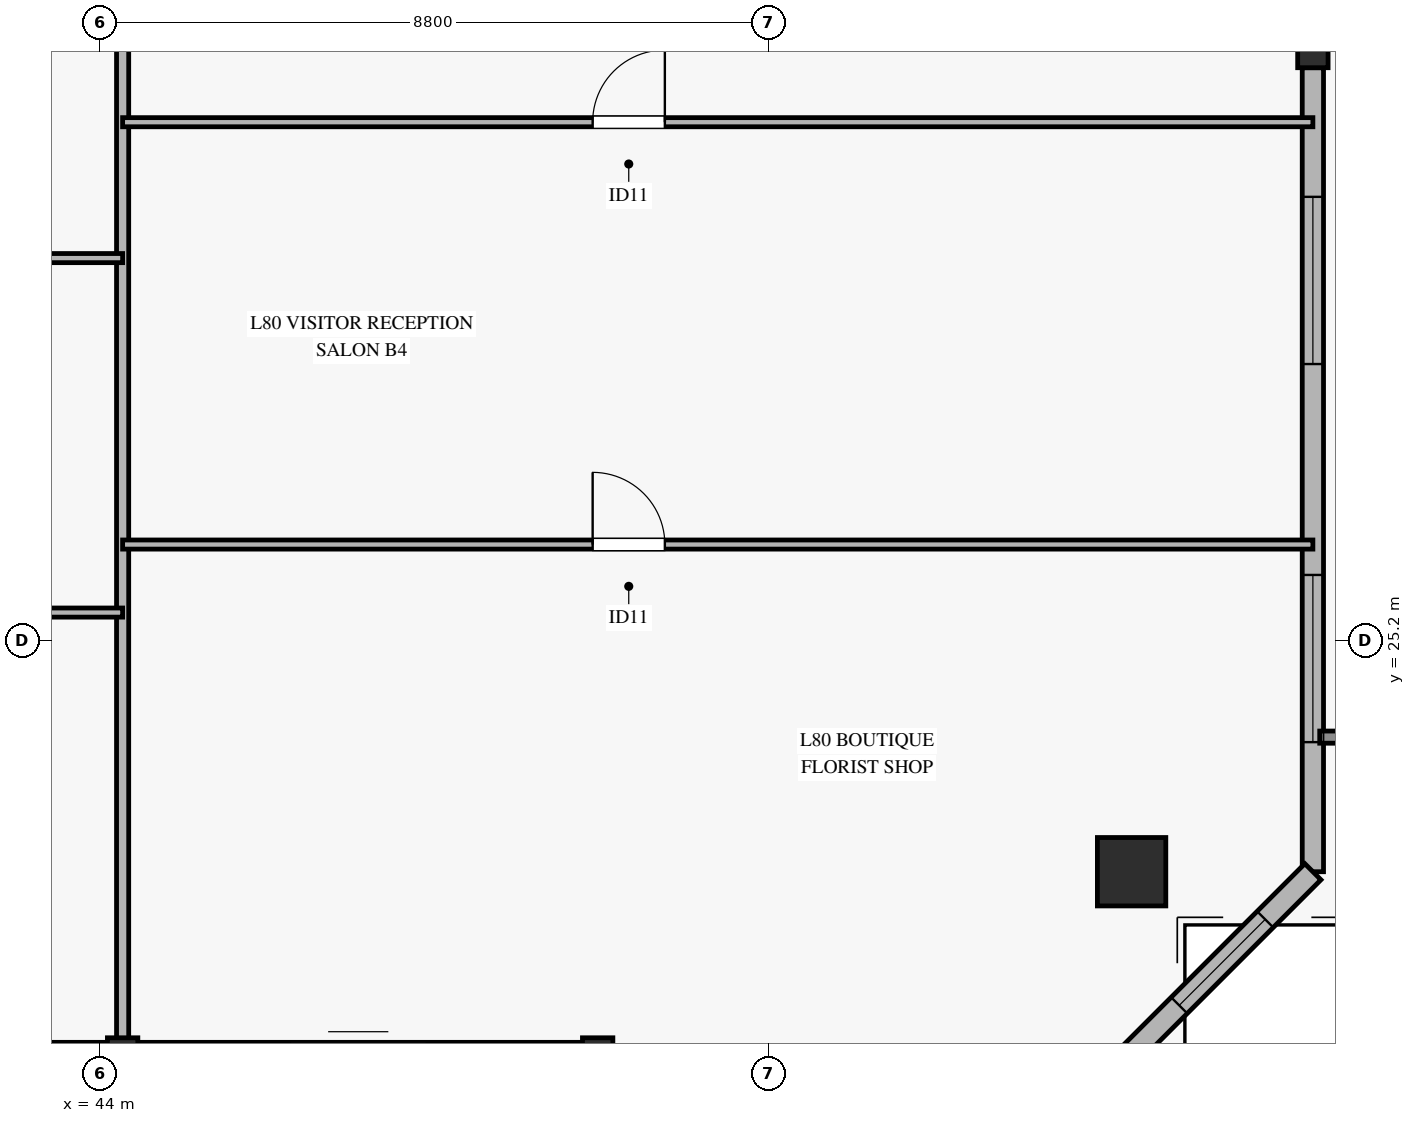
"""IFC4 building model, lengths in metres.
Left out: names, types, materials, properties, quantities, classifications, styles, units other than length and angle.
Written with IfcOpenShell. Run it as: python <this file> out.ifc"""

import sys

from ifc_helpers import new_model, si_unit, direction, frame, frame_2d, origin, origin_2d, place, context, subcontext, project, spatial, rectangle, hollow_rectangle, extrude, source, transform, mapped, element, fill, save


model = new_model("IFC4")
c1 = context("Model", 3, precision=1e-05, world=origin(), true_north=direction((0.0, 1.0)))
c2 = subcontext(c1, "Body", "Model", "MODEL_VIEW")
j1 = project(units=[si_unit("LENGTHUNIT", "METRE"), si_unit("PLANEANGLEUNIT", "RADIAN")], contexts=[c1])
p1 = place(None, origin())
s1 = spatial("IfcSite", under=j1, at=p1, CompositionType="ELEMENT")
p2 = place(p1, origin())
s2 = spatial("IfcBuilding", under=s1, at=p2, CompositionType="ELEMENT")
p3 = place(p2, frame((0.0, 0.0, 310.8)))
s3 = spatial("IfcBuildingStorey", under=s2, at=p3, CompositionType="ELEMENT", Elevation=310.8)
m1 = source(origin(), c2, "Body", "SweptSolid", [
    extrude(hollow_rectangle(XDim=0.9, YDim=0.9, WallThickness=0.04, at=origin_2d()), origin(), (0.0, 0.0, 1.0), 3.326),
])
p4 = place(p3, frame((57.575, 22.157, 0.0), z_axis=(-0.110324667468, 0.266085774831, 0.957615177501), x_axis=(-0.923746511534, -0.383004415679, 0.0)))
e1 = element("IfcColumn", 1, at=p4, inside=s3, PredefinedType="COLUMN", context=c2, shape_type="MappedRepresentation", body=[
    mapped(m1, transform((0.0, 0.0, 0.0), x_axis=(1.0, 0.0, 0.0), y_axis=(0.0, 1.0, 0.0), z_axis=(0.0, 0.0, 1.0), scale=1.0)),
])
m2 = source(origin(), c2, "Body", "SweptSolid", [
    extrude(hollow_rectangle(XDim=0.4, YDim=0.4, WallThickness=0.02, at=origin_2d()), origin(), (0.0, 0.0, 1.0), 3.319),
])
for number, where, z_axis, x_axis in (
    (2, (44.3, 19.772, 0.0), (0.0, 0.281, 0.96), (-1.0, 0.0, 0.0)),
    (3, (50.55, 19.772, 0.0), (0.0, 0.281, 0.96), (-1.0, 0.0, 0.0)),
):
    element("IfcColumn", number, at=place(p3, frame(where, z_axis=z_axis, x_axis=x_axis)), inside=s3, PredefinedType="COLUMN", context=c2, shape_type="MappedRepresentation", body=[
        mapped(m2, transform((0.0, 0.0, 0.0), x_axis=(1.0, 0.0, 0.0), y_axis=(0.0, 1.0, 0.0), z_axis=(0.0, 0.0, 1.0), scale=1.0)),
    ])
m3 = source(origin(), c2, "Body", "SweptSolid", [
    extrude(hollow_rectangle(XDim=0.4, YDim=0.4, WallThickness=0.02, at=origin_2d()), origin(), (0.0, 0.0, 1.0), 3.246),
])
p5 = place(p3, frame((59.96, 32.936, 0.0), z_axis=(-0.127580545586, 0.143603338163, 0.981377239219), x_axis=(-0.747582141628, -0.664169362075, 0.0)))
e4 = element("IfcColumn", 4, at=p5, inside=s3, PredefinedType="COLUMN", context=c2, shape_type="MappedRepresentation", body=[
    mapped(m3, transform((0.0, 0.0, 0.0), x_axis=(1.0, 0.0, 0.0), y_axis=(0.0, 1.0, 0.0), z_axis=(0.0, 0.0, 1.0), scale=1.0)),
])
p6 = place(p3, frame((37.75, 19.772, 0.0), z_axis=(0.0, 0.0, 1.0), x_axis=(1.0, 0.0, 0.0)))
e5 = element("IfcWall", 5, at=p6, inside=s3, PredefinedType="SOLIDWALL", context=c2, shape_type="SweptSolid", body=[
    extrude(rectangle(XDim=6.35, YDim=0.28, at=frame_2d((3.175, 0.0))), origin(), (0.0, 0.0, 1.0), 2.815),
])
p7 = place(p3, frame((44.5, 19.772, 0.0), z_axis=(0.0, 0.0, 1.0), x_axis=(1.0, 0.0, 0.0)))
e6 = element("IfcWall", 6, at=p7, inside=s3, PredefinedType="SOLIDWALL", context=c2, shape_type="SweptSolid", body=[
    extrude(rectangle(XDim=5.85, YDim=0.28, at=frame_2d((2.925, 0.0))), origin(), (0.0, 0.0, 1.0), 2.815),
])
p8 = place(p7, frame((2.0, 0.0, 0.0)))
e7 = element("IfcOpeningElement", 7, at=p8, cuts=e6, PredefinedType="OPENING", context=c2, shape_type="SweptSolid", body=[
    extrude(rectangle(XDim=1.8, YDim=2.25, at=frame_2d((0.9, 1.125))), frame((0.0, 0.15, 0.0), z_axis=(0.0, -1.0, 0.0), x_axis=(1.0, 0.0, 0.0)), (0.0, 0.0, 1.0), 0.3),
])
p9 = place(p3, frame((59.96, 22.157, 0.0), z_axis=(0.0, 0.0, 1.0), x_axis=(0.0, 1.0, 0.0)))
e8 = element("IfcWall", 8, at=p9, inside=s3, PredefinedType="SOLIDWALL", context=c2, shape_type="SweptSolid", body=[
    extrude(rectangle(XDim=10.579, YDim=0.28, at=frame_2d((5.29, 0.0))), origin(), (0.0, 0.0, 1.0), 2.815),
])
p10 = place(p9, frame((1.705, 0.0, 0.45)))
e9 = element("IfcOpeningElement", 9, at=p10, cuts=e8, PredefinedType="OPENING", context=c2, shape_type="SweptSolid", body=[
    extrude(rectangle(XDim=2.2, YDim=2.1, at=frame_2d((1.1, 1.05))), frame((0.0, 0.15, 0.0), z_axis=(0.0, -1.0, 0.0), x_axis=(1.0, 0.0, 0.0)), (0.0, 0.0, 1.0), 0.3),
])
p11 = place(p9, frame((6.68, 0.0, 0.45)))
e10 = element("IfcOpeningElement", 10, at=p11, cuts=e8, PredefinedType="OPENING", context=c2, shape_type="SweptSolid", body=[
    extrude(rectangle(XDim=2.2, YDim=2.1, at=frame_2d((1.1, 1.05))), frame((0.0, 0.15, 0.0), z_axis=(0.0, -1.0, 0.0), x_axis=(1.0, 0.0, 0.0)), (0.0, 0.0, 1.0), 0.3),
])
p12 = place(p3, frame((57.575, 19.772, 0.0), z_axis=(0.0, 0.0, 1.0), x_axis=(0.707106781187, 0.707106781187, 0.0)))
e11 = element("IfcWall", 11, at=p12, inside=s3, PredefinedType="SOLIDWALL", context=c2, shape_type="SweptSolid", body=[
    extrude(rectangle(XDim=3.373, YDim=0.3, at=frame_2d((1.687, 0.0))), origin(), (0.0, 0.0, 1.0), 2.815),
])
p13 = place(p12, frame((0.886, 0.0, 0.45)))
e12 = element("IfcOpeningElement", 12, at=p13, cuts=e11, PredefinedType="OPENING", context=c2, shape_type="SweptSolid", body=[
    extrude(rectangle(XDim=1.6, YDim=2.0, at=frame_2d((0.8, 1.0))), frame((0.0, 0.16, 0.0), z_axis=(0.0, -1.0, 0.0), x_axis=(1.0, 0.0, 0.0)), (0.0, 0.0, 1.0), 0.32),
])
p14 = place(p3, frame((44.3, 19.772, 0.0), z_axis=(0.0, 0.0, 1.0), x_axis=(0.0, 1.0, 0.0)))
e13 = element("IfcWall", 13, at=p14, inside=s3, PredefinedType="PARTITIONING", context=c2, shape_type="SweptSolid", body=[
    extrude(rectangle(XDim=17.678, YDim=0.16, at=frame_2d((8.839, 0.0))), origin(), (0.0, 0.0, 1.0), 2.47),
])
p15 = place(p14, frame((15.348, 0.0, 0.0)))
e14 = element("IfcOpeningElement", 14, at=p15, cuts=e13, PredefinedType="OPENING", context=c2, shape_type="SweptSolid", body=[
    extrude(rectangle(XDim=1.05, YDim=2.15, at=frame_2d((0.525, 1.075))), frame((0.0, 0.09, 0.0), z_axis=(0.0, -1.0, 0.0), x_axis=(1.0, 0.0, 0.0)), (0.0, 0.0, 1.0), 0.18),
])
p16 = place(p3, frame((34.4, 25.567, 0.0), z_axis=(0.0, 0.0, 1.0), x_axis=(1.0, 0.0, 0.0)))
e15 = element("IfcWall", 15, at=p16, inside=s3, PredefinedType="PARTITIONING", context=c2, shape_type="SweptSolid", body=[
    extrude(rectangle(XDim=9.9, YDim=0.12, at=frame_2d((4.95, 0.0))), origin(), (0.0, 0.0, 1.0), 2.47),
])
p17 = place(p16, frame((4.126, 0.0, 0.0)))
e16 = element("IfcOpeningElement", 16, at=p17, cuts=e15, PredefinedType="OPENING", context=c2, shape_type="SweptSolid", body=[
    extrude(rectangle(XDim=0.95, YDim=2.1, at=frame_2d((0.475, 1.05))), frame((0.0, 0.07, 0.0), z_axis=(0.0, -1.0, 0.0), x_axis=(1.0, 0.0, 0.0)), (0.0, 0.0, 1.0), 0.14),
])
p18 = place(p3, frame((34.4, 30.231, 0.0), z_axis=(0.0, 0.0, 1.0), x_axis=(1.0, 0.0, 0.0)))
e17 = element("IfcWall", 17, at=p18, inside=s3, PredefinedType="PARTITIONING", context=c2, shape_type="SweptSolid", body=[
    extrude(rectangle(XDim=9.9, YDim=0.12, at=frame_2d((4.95, 0.0))), origin(), (0.0, 0.0, 1.0), 2.47),
])
p19 = place(p18, frame((4.126, 0.0, 0.0)))
e18 = element("IfcOpeningElement", 18, at=p19, cuts=e17, PredefinedType="OPENING", context=c2, shape_type="SweptSolid", body=[
    extrude(rectangle(XDim=0.95, YDim=2.1, at=frame_2d((0.475, 1.05))), frame((0.0, 0.07, 0.0), z_axis=(0.0, -1.0, 0.0), x_axis=(1.0, 0.0, 0.0)), (0.0, 0.0, 1.0), 0.14),
])
p20 = place(p3, frame((44.3, 26.462, 0.0), z_axis=(0.0, 0.0, 1.0), x_axis=(1.0, 0.0, 0.0)))
e19 = element("IfcWall", 19, at=p20, inside=s3, PredefinedType="PARTITIONING", context=c2, shape_type="SweptSolid", body=[
    extrude(rectangle(XDim=15.66, YDim=0.12, at=frame_2d((7.83, 0.0))), origin(), (0.0, 0.0, 1.0), 2.47),
])
p21 = place(p20, frame((6.184, 0.0, 0.0)))
e20 = element("IfcOpeningElement", 20, at=p21, cuts=e19, PredefinedType="OPENING", context=c2, shape_type="SweptSolid", body=[
    extrude(rectangle(XDim=0.95, YDim=2.1, at=frame_2d((0.475, 1.05))), frame((0.0, 0.07, 0.0), z_axis=(0.0, -1.0, 0.0), x_axis=(1.0, 0.0, 0.0)), (0.0, 0.0, 1.0), 0.14),
])
p22 = place(p3, frame((44.3, 32.019, 0.0), z_axis=(0.0, 0.0, 1.0), x_axis=(1.0, 0.0, 0.0)))
e21 = element("IfcWall", 21, at=p22, inside=s3, PredefinedType="PARTITIONING", context=c2, shape_type="SweptSolid", body=[
    extrude(rectangle(XDim=15.66, YDim=0.12, at=frame_2d((7.83, 0.0))), origin(), (0.0, 0.0, 1.0), 2.47),
])
p23 = place(p22, frame((6.184, 0.0, 0.0)))
e22 = element("IfcOpeningElement", 22, at=p23, cuts=e21, PredefinedType="OPENING", context=c2, shape_type="SweptSolid", body=[
    extrude(rectangle(XDim=0.95, YDim=2.1, at=frame_2d((0.475, 1.05))), frame((0.0, 0.07, 0.0), z_axis=(0.0, -1.0, 0.0), x_axis=(1.0, 0.0, 0.0)), (0.0, 0.0, 1.0), 0.14),
])
m4 = source(origin(), c2, "Body", "SweptSolid", [
    extrude(rectangle(XDim=2.2, YDim=2.1, at=frame_2d((1.1, 1.05))), frame((0.0, 0.03, 0.0), z_axis=(0.0, -1.0, 0.0), x_axis=(1.0, 0.0, 0.0)), (0.0, 0.0, 1.0), 0.06),
])
p24 = place(p10, origin())
e23 = element("IfcWindow", 23, at=p24, inside=s3, PartitioningType="SINGLE_PANEL", PredefinedType="WINDOW", context=c2, shape_type="MappedRepresentation", body=[
    mapped(m4, transform((0.0, 0.0, 0.0), x_axis=(1.0, 0.0, 0.0), y_axis=(0.0, 1.0, 0.0), z_axis=(0.0, 0.0, 1.0), scale=1.0)),
])
fill(e9, e23)
p25 = place(p11, origin())
e24 = element("IfcWindow", 24, at=p25, inside=s3, PartitioningType="SINGLE_PANEL", PredefinedType="WINDOW", context=c2, shape_type="MappedRepresentation", body=[
    mapped(m4, transform((0.0, 0.0, 0.0), x_axis=(1.0, 0.0, 0.0), y_axis=(0.0, 1.0, 0.0), z_axis=(0.0, 0.0, 1.0), scale=1.0)),
])
fill(e10, e24)
m5 = source(origin(), c2, "Body", "SweptSolid", [
    extrude(rectangle(XDim=1.6, YDim=2.0, at=frame_2d((0.8, 1.0))), frame((0.0, 0.03, 0.0), z_axis=(0.0, -1.0, 0.0), x_axis=(1.0, 0.0, 0.0)), (0.0, 0.0, 1.0), 0.06),
])
p26 = place(p13, origin())
e25 = element("IfcWindow", 25, at=p26, inside=s3, PartitioningType="SINGLE_PANEL", PredefinedType="WINDOW", context=c2, shape_type="MappedRepresentation", body=[
    mapped(m5, transform((0.0, 0.0, 0.0), x_axis=(1.0, 0.0, 0.0), y_axis=(0.0, 1.0, 0.0), z_axis=(0.0, 0.0, 1.0), scale=1.0)),
])
fill(e12, e25)
m6 = source(origin(), c2, "Body", "SweptSolid", [
    extrude(rectangle(XDim=0.95, YDim=2.1, at=frame_2d((0.475, 1.05))), frame((0.0, 0.025, 0.0), z_axis=(0.0, -1.0, 0.0), x_axis=(1.0, 0.0, 0.0)), (0.0, 0.0, 1.0), 0.05),
])
p27 = place(p23, origin())
e26 = element("IfcDoor", 26, at=p27, inside=s3, OperationType="SINGLE_SWING_RIGHT", PredefinedType="DOOR", context=c2, shape_type="MappedRepresentation", body=[
    mapped(m6, transform((0.0, 0.0, 0.0), x_axis=(1.0, 0.0, 0.0), y_axis=(0.0, 1.0, 0.0), z_axis=(0.0, 0.0, 1.0), scale=1.0)),
])
fill(e22, e26)
p28 = place(p21, origin())
e27 = element("IfcDoor", 27, at=p28, inside=s3, OperationType="SINGLE_SWING_LEFT", PredefinedType="DOOR", context=c2, shape_type="MappedRepresentation", body=[
    mapped(m6, transform((0.0, 0.0, 0.0), x_axis=(1.0, 0.0, 0.0), y_axis=(0.0, 1.0, 0.0), z_axis=(0.0, 0.0, 1.0), scale=1.0)),
])
fill(e20, e27)
save(model, sys.argv[1])
